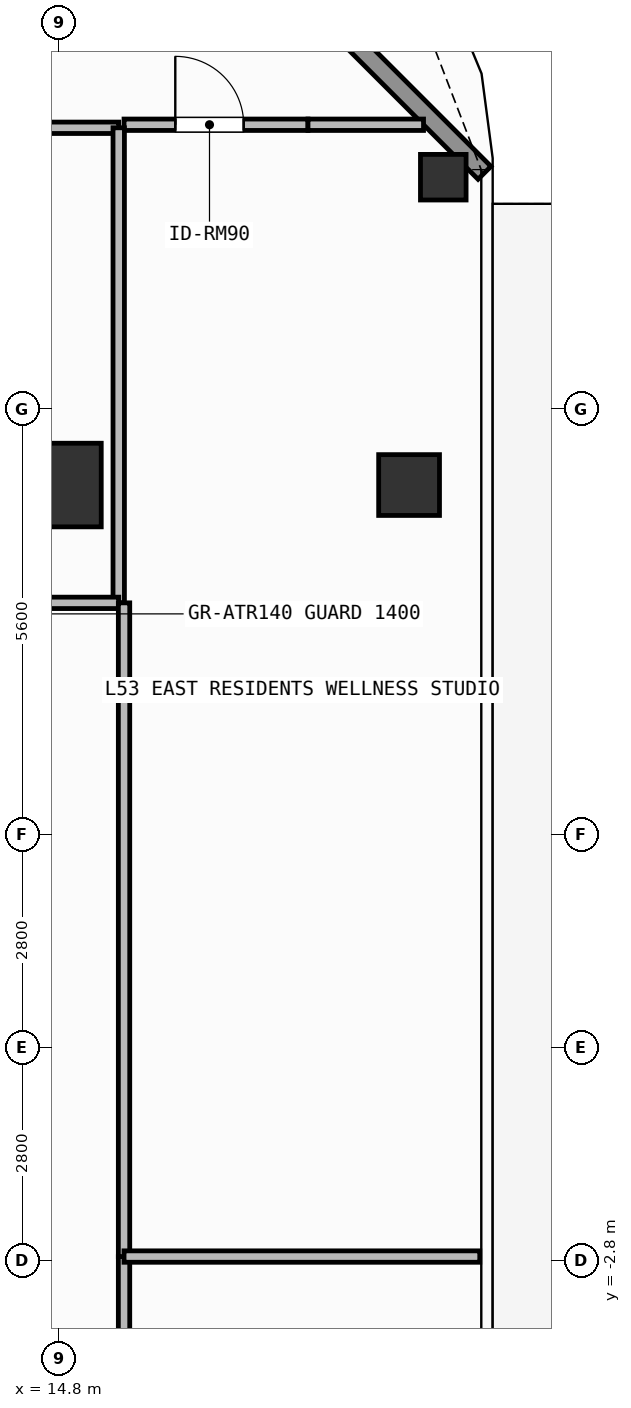
"""IFC4 building model, lengths in metres.
Left out: names, types, materials, properties, quantities, classifications, styles, units other than length and angle.
Written with IfcOpenShell. Run it as: python <this file> out.ifc"""

import sys

from ifc_helpers import new_model, si_unit, direction, frame, frame_2d, origin, origin_2d, place, context, subcontext, project, spatial, rectangle, hollow_rectangle, extrude, element, fill, save


model = new_model("IFC4")
c1 = context("Model", 3, precision=1e-05, world=origin(), true_north=direction((0.0, 1.0)))
c2 = subcontext(c1, "Body", "Model", "MODEL_VIEW")
j1 = project(units=[si_unit("LENGTHUNIT", "METRE"), si_unit("PLANEANGLEUNIT", "RADIAN")], contexts=[c1])
p1 = place(None, origin())
s1 = spatial("IfcSite", under=j1, at=p1, CompositionType="ELEMENT")
p2 = place(p1, origin())
s2 = spatial("IfcBuilding", under=s1, at=p2, CompositionType="ELEMENT")
p3 = place(p2, frame((0.0, 0.0, 215.7)))
s3 = spatial("IfcBuildingStorey", under=s2, at=p3, CompositionType="ELEMENT", Elevation=215.7)
p4 = place(p3, frame((14.8, 7.4, 0.0), z_axis=(0.0, 0.0, 1.0), x_axis=(1.0, 0.0, 0.0)))
e1 = element("IfcColumn", 1, at=p4, inside=s3, PredefinedType="COLUMN", context=c2, shape_type="SweptSolid", body=[
    extrude(rectangle(XDim=1.1, YDim=1.1, at=origin_2d()), origin(), (0.0, 0.0, 1.0), 3.9),
])
p5 = place(p3, frame((19.4, 7.4, 0.0), z_axis=(0.0, 0.0, 1.0), x_axis=(1.0, 0.0, 0.0)))
e2 = element("IfcColumn", 2, at=p5, inside=s3, PredefinedType="COLUMN", context=c2, shape_type="SweptSolid", body=[
    extrude(hollow_rectangle(XDim=0.8, YDim=0.8, WallThickness=0.036, at=origin_2d()), origin(), (0.0, 0.0, 1.0), 3.9),
])
p6 = place(p3, frame((19.85, 11.45, 0.0), z_axis=(0.0, 0.0, 1.0), x_axis=(1.0, 0.0, 0.0)))
e3 = element("IfcColumn", 3, at=p6, inside=s3, PredefinedType="COLUMN", context=c2, shape_type="SweptSolid", body=[
    extrude(hollow_rectangle(XDim=0.6, YDim=0.6, WallThickness=0.028, at=origin_2d()), origin(), (0.0, 0.0, 1.0), 3.9),
])
p7 = place(p3, frame((16.008, 15.892, 0.0), z_axis=(0.0, 0.0, 1.0), x_axis=(0.707106781187, -0.707106781187, 0.0)))
e4 = element("IfcWall", 4, at=p7, inside=s3, PredefinedType="SOLIDWALL", context=c2, shape_type="SweptSolid", body=[
    extrude(rectangle(XDim=6.201, YDim=0.24, at=frame_2d((3.101, 0.0))), origin(), (0.0, 0.0, 1.0), 3.62),
])
p8 = place(p3, frame((8.36, 12.1, 0.0), z_axis=(0.0, 0.0, 1.0), x_axis=(1.0, 0.0, 0.0)))
e5 = element("IfcWall", 5, at=p8, inside=s3, PredefinedType="PARTITIONING", context=c2, shape_type="SweptSolid", body=[
    extrude(rectangle(XDim=7.22, YDim=0.15, at=frame_2d((3.61, 0.0))), origin(), (0.0, 0.0, 1.0), 3.62),
])
p9 = place(p8, frame((3.513, 0.0, 0.0)))
e6 = element("IfcOpeningElement", 6, at=p9, cuts=e5, PredefinedType="OPENING", context=c2, shape_type="SweptSolid", body=[
    extrude(rectangle(XDim=0.9, YDim=2.1, at=frame_2d((0.45, 1.05))), frame((0.0, 0.085, 0.0), z_axis=(0.0, -1.0, 0.0), x_axis=(1.0, 0.0, 0.0)), (0.0, 0.0, 1.0), 0.17),
])
p10 = place(p3, frame((15.65, 12.14, 0.0), z_axis=(0.0, 0.0, 1.0), x_axis=(1.0, 0.0, 0.0)))
e7 = element("IfcWall", 7, at=p10, inside=s3, PredefinedType="PARTITIONING", context=c2, shape_type="SweptSolid", body=[
    extrude(rectangle(XDim=2.42, YDim=0.15, at=frame_2d((1.21, 0.0))), origin(), (0.0, 0.0, 1.0), 3.62),
])
p11 = place(p10, frame((0.674, 0.0, 0.0)))
e8 = element("IfcOpeningElement", 8, at=p11, cuts=e7, PredefinedType="OPENING", context=c2, shape_type="SweptSolid", body=[
    extrude(rectangle(XDim=0.9, YDim=2.1, at=frame_2d((0.45, 1.05))), frame((0.0, 0.085, 0.0), z_axis=(0.0, -1.0, 0.0), x_axis=(1.0, 0.0, 0.0)), (0.0, 0.0, 1.0), 0.17),
])
p12 = place(p3, frame((15.58, 5.85, 0.0), z_axis=(0.0, 0.0, 1.0), x_axis=(0.0, 1.0, 0.0)))
e9 = element("IfcWall", 9, at=p12, inside=s3, PredefinedType="PARTITIONING", context=c2, shape_type="SweptSolid", body=[
    extrude(rectangle(XDim=6.25, YDim=0.15, at=frame_2d((3.125, 0.0))), origin(), (0.0, 0.0, 1.0), 3.62),
])
p13 = place(p3, frame((8.96, 5.85, 0.0), z_axis=(0.0, 0.0, 1.0), x_axis=(1.0, 0.0, 0.0)))
e10 = element("IfcWall", 10, at=p13, inside=s3, PredefinedType="PARTITIONING", context=c2, shape_type="SweptSolid", body=[
    extrude(rectangle(XDim=6.62, YDim=0.15, at=frame_2d((3.31, 0.0))), origin(), (0.0, 0.0, 1.0), 3.62),
])
p14 = place(p3, frame((15.65, -5.85, 0.0), z_axis=(0.0, 0.0, 1.0), x_axis=(0.0, 1.0, 0.0)))
e11 = element("IfcWall", 11, at=p14, inside=s3, PredefinedType="PARTITIONING", context=c2, shape_type="SweptSolid", body=[
    extrude(rectangle(XDim=3.1, YDim=0.15, at=frame_2d((1.55, 0.0))), origin(), (0.0, 0.0, 1.0), 3.62),
])
p15 = place(p3, frame((15.65, -2.75, 0.0), z_axis=(0.0, 0.0, 1.0), x_axis=(0.0, 1.0, 0.0)))
e12 = element("IfcWall", 12, at=p15, inside=s3, PredefinedType="PARTITIONING", context=c2, shape_type="SweptSolid", body=[
    extrude(rectangle(XDim=8.6, YDim=0.15, at=frame_2d((4.3, 0.0))), origin(), (0.0, 0.0, 1.0), 3.62),
])
p16 = place(p3, frame((15.65, -2.75, 0.0), z_axis=(0.0, 0.0, 1.0), x_axis=(1.0, 0.0, 0.0)))
e13 = element("IfcWall", 13, at=p16, inside=s3, PredefinedType="PARTITIONING", context=c2, shape_type="SweptSolid", body=[
    extrude(rectangle(XDim=4.68, YDim=0.15, at=frame_2d((2.34, 0.0))), origin(), (0.0, 0.0, 1.0), 3.62),
])
p17 = place(p3, frame((18.07, 12.14, 0.0), z_axis=(0.0, 0.0, 1.0), x_axis=(1.0, 0.0, 0.0)))
e14 = element("IfcWall", 14, at=p17, inside=s3, PredefinedType="PARTITIONING", context=c2, shape_type="SweptSolid", body=[
    extrude(rectangle(XDim=1.52, YDim=0.15, at=frame_2d((0.76, 0.0))), origin(), (0.0, 0.0, 1.0), 3.62),
])
p18 = place(p11, origin())
e15 = element("IfcDoor", 15, at=p18, inside=s3, OperationType="SINGLE_SWING_LEFT", PredefinedType="DOOR", context=c2, shape_type="SweptSolid", body=[
    extrude(rectangle(XDim=0.9, YDim=2.1, at=frame_2d((0.45, 1.05))), frame((0.0, 0.025, 0.0), z_axis=(0.0, -1.0, 0.0), x_axis=(1.0, 0.0, 0.0)), (0.0, 0.0, 1.0), 0.05),
])
fill(e8, e15)
save(model, sys.argv[1])
